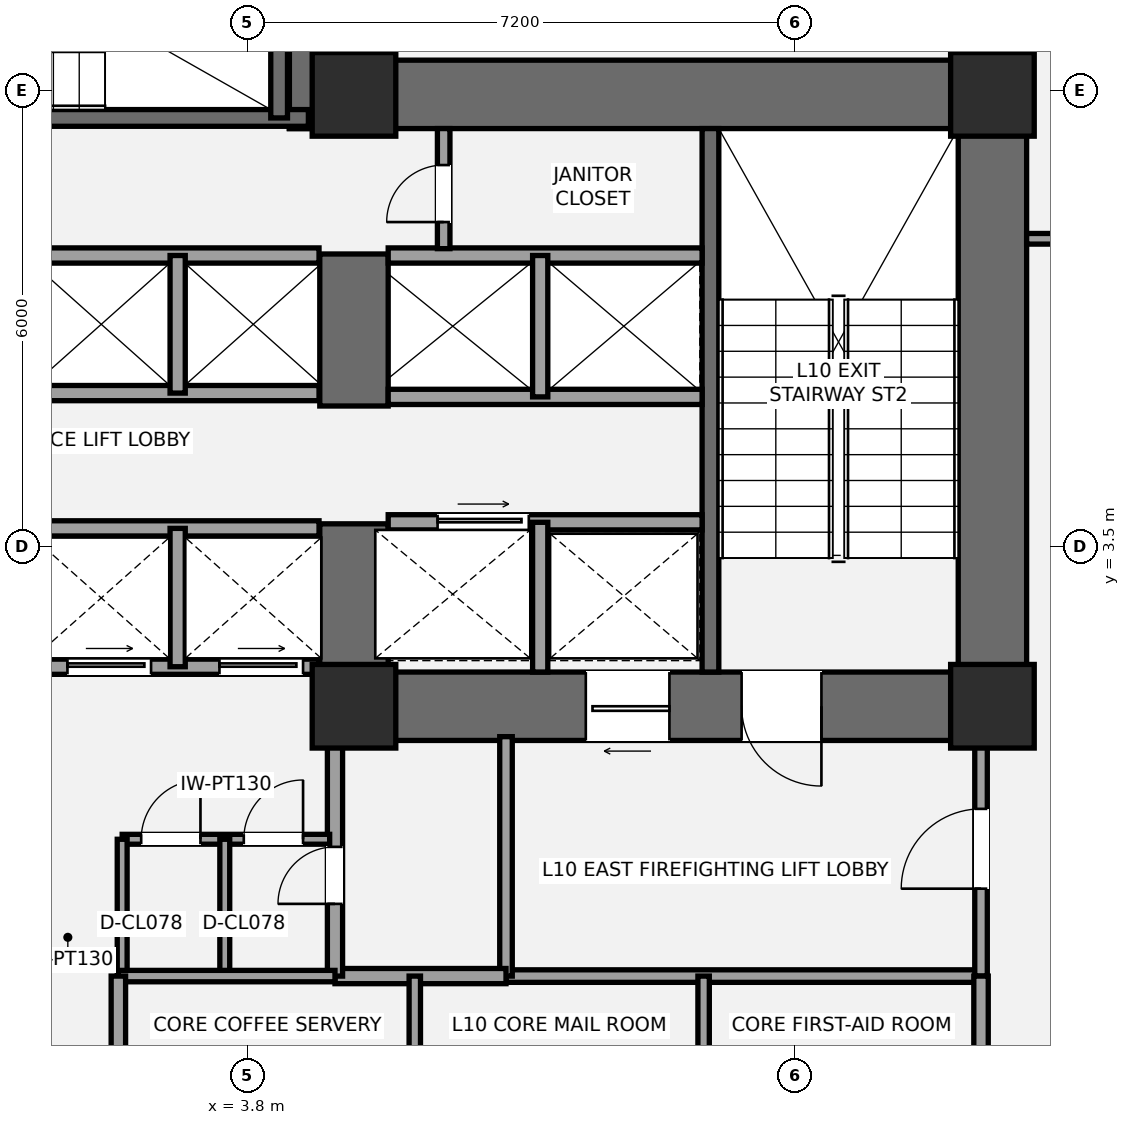
"""IFC4 building model, lengths in metres.
Left out: names, types, materials, properties, quantities, classifications, styles, units other than length and angle.
Written with IfcOpenShell. Run it as: python <this file> out.ifc"""

import sys

from ifc_helpers import new_model, si_unit, direction, frame, frame_2d, origin, origin_2d, place, context, subcontext, project, spatial, rectangle, extrude, element, fill, save


model = new_model("IFC4")
c1 = context("Model", 3, precision=1e-05, world=origin(), true_north=direction((0.0, 1.0)))
c2 = subcontext(c1, "Body", "Model", "MODEL_VIEW")
j1 = project(units=[si_unit("LENGTHUNIT", "METRE"), si_unit("PLANEANGLEUNIT", "RADIAN")], contexts=[c1])
p1 = place(None, origin())
s1 = spatial("IfcSite", under=j1, at=p1, CompositionType="ELEMENT")
p2 = place(p1, origin())
s2 = spatial("IfcBuilding", under=s1, at=p2, CompositionType="ELEMENT")
p3 = place(p2, frame((0.0, 0.0, 41.4)))
s3 = spatial("IfcBuildingStorey", under=s2, at=p3, CompositionType="ELEMENT", Elevation=41.4)
p4 = place(p3, frame((13.6, 0.95, 0.0), z_axis=(0.0, 0.0, 1.0), x_axis=(0.0, 1.0, 0.0)))
e1 = element("IfcWall", 1, at=p4, inside=s3, PredefinedType="SHEAR", context=c2, shape_type="SweptSolid", body=[
    extrude(rectangle(XDim=8.95, YDim=0.9, at=frame_2d((4.475, 0.0))), origin(), (0.0, 0.0, 1.0), 3.6),
])
p5 = place(p3, frame((4.35, 9.45, 0.0), z_axis=(0.0, 0.0, 1.0), x_axis=(1.0, 0.0, 0.0)))
e2 = element("IfcWall", 2, at=p5, inside=s3, PredefinedType="SHEAR", context=c2, shape_type="SweptSolid", body=[
    extrude(rectangle(XDim=9.7, YDim=0.9, at=frame_2d((4.85, 0.0))), origin(), (0.0, 0.0, 1.0), 3.6),
])
p6 = place(p3, frame((14.05, 1.4, 0.0), z_axis=(0.0, 0.0, 1.0), x_axis=(-1.0, 0.0, 0.0)))
e3 = element("IfcWall", 3, at=p6, inside=s3, PredefinedType="SHEAR", context=c2, shape_type="SweptSolid", body=[
    extrude(rectangle(XDim=9.3, YDim=0.9, at=frame_2d((4.65, 0.0))), origin(), (0.0, 0.0, 1.0), 3.6),
])
p7 = place(p6, frame((2.7, 0.0, 0.0)))
e4 = element("IfcOpeningElement", 4, at=p7, cuts=e3, PredefinedType="OPENING", context=c2, shape_type="SweptSolid", body=[
    extrude(rectangle(XDim=1.05, YDim=2.15, at=frame_2d((0.525, 1.075))), frame((0.0, 0.46, 0.0), z_axis=(0.0, -1.0, 0.0), x_axis=(1.0, 0.0, 0.0)), (0.0, 0.0, 1.0), 0.92),
])
p8 = place(p6, frame((4.7, 0.0, 0.0)))
e5 = element("IfcOpeningElement", 5, at=p8, cuts=e3, PredefinedType="OPENING", context=c2, shape_type="SweptSolid", body=[
    extrude(rectangle(XDim=1.1, YDim=2.2, at=frame_2d((0.55, 1.1))), frame((0.0, 0.46, 0.0), z_axis=(0.0, -1.0, 0.0), x_axis=(1.0, 0.0, 0.0)), (0.0, 0.0, 1.0), 0.92),
])
p9 = place(p3, frame((5.2, 0.95, 0.0), z_axis=(0.0, 0.0, 1.0), x_axis=(0.0, 1.0, 0.0)))
e6 = element("IfcWall", 6, at=p9, inside=s3, PredefinedType="SHEAR", context=c2, shape_type="SweptSolid", body=[
    extrude(rectangle(XDim=2.85, YDim=0.9, at=frame_2d((1.425, 0.0))), origin(), (0.0, 0.0, 1.0), 3.6),
])
p10 = place(p3, frame((5.2, 5.35, 0.0), z_axis=(0.0, 0.0, 1.0), x_axis=(0.0, 1.0, 0.0)))
e7 = element("IfcWall", 7, at=p10, inside=s3, PredefinedType="SHEAR", context=c2, shape_type="SweptSolid", body=[
    extrude(rectangle(XDim=2.0, YDim=0.9, at=frame_2d((1.0, 0.0))), origin(), (0.0, 0.0, 1.0), 3.6),
])
p11 = place(p3, frame((9.89, 1.85, 0.0), z_axis=(0.0, 0.0, 1.0), x_axis=(0.0, 1.0, 0.0)))
e8 = element("IfcWall", 8, at=p11, inside=s3, PredefinedType="SHEAR", context=c2, shape_type="SweptSolid", body=[
    extrude(rectangle(XDim=7.15, YDim=0.22, at=frame_2d((3.575, 0.0))), origin(), (0.0, 0.0, 1.0), 3.6),
])
p12 = place(p3, frame((4.8, 9.0, 0.0), z_axis=(0.0, 0.0, 1.0), x_axis=(0.0, 1.0, 0.0)))
e9 = element("IfcWall", 9, at=p12, inside=s3, PredefinedType="SHEAR", context=c2, shape_type="SweptSolid", body=[
    extrude(rectangle(XDim=4.3, YDim=0.9, at=frame_2d((2.15, 0.0))), origin(), (0.0, 0.0, 1.0), 3.6),
])
p13 = place(p3, frame((-4.7, 9.14, 0.0), z_axis=(0.0, 0.0, 1.0), x_axis=(1.0, 0.0, 0.0)))
e10 = element("IfcWall", 10, at=p13, inside=s3, PredefinedType="SHEAR", context=c2, shape_type="SweptSolid", body=[
    extrude(rectangle(XDim=9.3, YDim=0.22, at=frame_2d((4.65, 0.0))), origin(), (0.0, 0.0, 1.0), 3.6),
])
p14 = place(p13, frame((1.15, 0.0, 0.0)))
e11 = element("IfcOpeningElement", 11, at=p14, cuts=e10, PredefinedType="OPENING", context=c2, shape_type="SweptSolid", body=[
    extrude(rectangle(XDim=1.05, YDim=2.15, at=frame_2d((0.525, 1.075))), frame((0.0, 0.12, 0.0), z_axis=(0.0, -1.0, 0.0), x_axis=(1.0, 0.0, 0.0)), (0.0, 0.0, 1.0), 0.24),
])
p15 = place(p3, frame((4.215, 9.14, 0.0), z_axis=(0.0, 0.0, 1.0), x_axis=(0.0, 1.0, 0.0)))
e12 = element("IfcWall", 12, at=p15, inside=s3, PredefinedType="SHEAR", context=c2, shape_type="SweptSolid", body=[
    extrude(rectangle(XDim=3.26, YDim=0.22, at=frame_2d((1.63, 0.0))), origin(), (0.0, 0.0, 1.0), 3.6),
])
for number, where, z_axis, x_axis in (
    (13, (5.2, 1.4, 0.0), (0.0, 0.0, 1.0), (1.0, 0.0, 0.0)),
    (14, (5.2, 9.45, 0.0), (0.0, 0.0, 1.0), (1.0, 0.0, 0.0)),
    (15, (13.6, 1.4, 0.0), (0.0, 0.0, 1.0), (1.0, 0.0, 0.0)),
    (16, (13.6, 9.45, 0.0), (0.0, 0.0, 1.0), (1.0, 0.0, 0.0)),
):
    element("IfcColumn", number, at=place(p3, frame(where, z_axis=z_axis, x_axis=x_axis)), inside=s3, PredefinedType="COLUMN", context=c2, shape_type="SweptSolid", body=[
        extrude(rectangle(XDim=1.1, YDim=1.1, at=origin_2d()), origin(), (0.0, 0.0, 1.0), 3.6),
    ])
p16 = place(p3, frame((7.2, -2.15, 0.0), z_axis=(0.0, 0.0, 1.0), x_axis=(1.0, 0.0, 0.0)))
e17 = element("IfcWall", 17, at=p16, inside=s3, PredefinedType="PARTITIONING", context=c2, shape_type="SweptSolid", body=[
    extrude(rectangle(XDim=6.25, YDim=0.165, at=frame_2d((3.125, 0.0))), origin(), (0.0, 0.0, 1.0), 3.4),
])
p17 = place(p3, frame((7.2, -2.15, 0.0), z_axis=(0.0, 0.0, 1.0), x_axis=(0.0, 1.0, 0.0)))
e18 = element("IfcWall", 18, at=p17, inside=s3, PredefinedType="PARTITIONING", context=c2, shape_type="SweptSolid", body=[
    extrude(rectangle(XDim=3.15, YDim=0.165, at=frame_2d((1.575, 0.0))), origin(), (0.0, 0.0, 1.0), 2.853),
])
p18 = place(p3, frame((13.45, -2.15, 0.0), z_axis=(0.0, 0.0, 1.0), x_axis=(0.0, 1.0, 0.0)))
e19 = element("IfcWall", 19, at=p18, inside=s3, PredefinedType="PARTITIONING", context=c2, shape_type="SweptSolid", body=[
    extrude(rectangle(XDim=3.15, YDim=0.165, at=frame_2d((1.575, 0.0))), origin(), (0.0, 0.0, 1.0), 2.853),
])
p19 = place(p18, frame((1.15, 0.0, 0.0)))
e20 = element("IfcOpeningElement", 20, at=p19, cuts=e19, PredefinedType="OPENING", context=c2, shape_type="SweptSolid", body=[
    extrude(rectangle(XDim=1.05, YDim=2.15, at=frame_2d((0.525, 1.075))), frame((0.0, 0.093, 0.0), z_axis=(0.0, -1.0, 0.0), x_axis=(1.0, 0.0, 0.0)), (0.0, 0.0, 1.0), 0.185),
])
p20 = place(p3, frame((4.95, -2.15, 0.0), z_axis=(0.0, 0.0, 1.0), x_axis=(1.0, 0.0, 0.0)))
e21 = element("IfcWall", 21, at=p20, inside=s3, PredefinedType="SOLIDWALL", context=c2, shape_type="SweptSolid", body=[
    extrude(rectangle(XDim=2.25, YDim=0.2, at=frame_2d((1.125, 0.0))), origin(), (0.0, 0.0, 1.0), 3.4),
])
p21 = place(p3, frame((4.95, -2.15, 0.0), z_axis=(0.0, 0.0, 1.0), x_axis=(0.0, 1.0, 0.0)))
e22 = element("IfcWall", 22, at=p21, inside=s3, PredefinedType="SOLIDWALL", context=c2, shape_type="SweptSolid", body=[
    extrude(rectangle(XDim=3.15, YDim=0.2, at=frame_2d((1.575, 0.0))), origin(), (0.0, 0.0, 1.0), 3.4),
])
p22 = place(p21, frame((0.95, 0.0, 0.0)))
e23 = element("IfcOpeningElement", 23, at=p22, cuts=e22, PredefinedType="OPENING", context=c2, shape_type="SweptSolid", body=[
    extrude(rectangle(XDim=0.75, YDim=2.1, at=frame_2d((0.375, 1.05))), frame((0.0, 0.11, 0.0), z_axis=(0.0, -1.0, 0.0), x_axis=(1.0, 0.0, 0.0)), (0.0, 0.0, 1.0), 0.22),
])
p23 = place(p3, frame((2.15, -0.35, 0.0), z_axis=(0.0, 0.0, 1.0), x_axis=(1.0, 0.0, 0.0)))
e24 = element("IfcWall", 24, at=p23, inside=s3, PredefinedType="PARTITIONING", context=c2, shape_type="SweptSolid", body=[
    extrude(rectangle(XDim=2.73, YDim=0.13, at=frame_2d((1.365, 0.0))), origin(), (0.0, 0.0, 1.0), 3.4),
])
p24 = place(p23, frame((0.25, 0.0, 0.0)))
e25 = element("IfcOpeningElement", 25, at=p24, cuts=e24, PredefinedType="OPENING", context=c2, shape_type="SweptSolid", body=[
    extrude(rectangle(XDim=0.78, YDim=2.1, at=frame_2d((0.39, 1.05))), frame((0.0, 0.075, 0.0), z_axis=(0.0, -1.0, 0.0), x_axis=(1.0, 0.0, 0.0)), (0.0, 0.0, 1.0), 0.15),
])
p25 = place(p23, frame((1.6, 0.0, 0.0)))
e26 = element("IfcOpeningElement", 26, at=p25, cuts=e24, PredefinedType="OPENING", context=c2, shape_type="SweptSolid", body=[
    extrude(rectangle(XDim=0.78, YDim=2.1, at=frame_2d((0.39, 1.05))), frame((0.0, 0.075, 0.0), z_axis=(0.0, -1.0, 0.0), x_axis=(1.0, 0.0, 0.0)), (0.0, 0.0, 1.0), 0.15),
])
for number, where, z_axis, x_axis in (
    (27, (2.15, -2.15, 0.0), (0.0, 0.0, 1.0), (0.0, 1.0, 0.0)),
    (28, (3.5, -2.15, 0.0), (0.0, 0.0, 1.0), (0.0, 1.0, 0.0)),
):
    element("IfcWall", number, at=place(p3, frame(where, z_axis=z_axis, x_axis=x_axis)), inside=s3, PredefinedType="PARTITIONING", context=c2, shape_type="SweptSolid", body=[
        extrude(rectangle(XDim=1.8, YDim=0.13, at=frame_2d((0.9, 0.0))), origin(), (0.0, 0.0, 1.0), 3.4),
    ])
p26 = place(p3, frame((5.65, 3.82, 0.0), z_axis=(0.0, 0.0, 1.0), x_axis=(1.0, 0.0, 0.0)))
e29 = element("IfcWall", 29, at=p26, inside=s3, PredefinedType="SOLIDWALL", context=c2, shape_type="SweptSolid", body=[
    extrude(rectangle(XDim=4.13, YDim=0.2, at=frame_2d((2.065, 0.0))), origin(), (0.0, 0.0, 1.0), 3.4),
])
p27 = place(p26, frame((0.65, 0.0, 0.0)))
e30 = element("IfcOpeningElement", 30, at=p27, cuts=e29, PredefinedType="OPENING", context=c2, shape_type="SweptSolid", body=[
    extrude(rectangle(XDim=1.2, YDim=2.2, at=frame_2d((0.6, 1.1))), frame((0.0, 0.11, 0.0), z_axis=(0.0, -1.0, 0.0), x_axis=(1.0, 0.0, 0.0)), (0.0, 0.0, 1.0), 0.22),
])
p28 = place(p3, frame((7.65, 1.85, 0.0), z_axis=(0.0, 0.0, 1.0), x_axis=(0.0, 1.0, 0.0)))
e31 = element("IfcWall", 31, at=p28, inside=s3, PredefinedType="SOLIDWALL", context=c2, shape_type="SweptSolid", body=[
    extrude(rectangle(XDim=1.97, YDim=0.2, at=frame_2d((0.985, 0.0))), origin(), (0.0, 0.0, 1.0), 3.4),
])
for number, where, z_axis, x_axis in (
    (32, (5.65, 5.47, 0.0), (0.0, 0.0, 1.0), (1.0, 0.0, 0.0)),
    (33, (5.65, 7.33, 0.0), (0.0, 0.0, 1.0), (1.0, 0.0, 0.0)),
):
    element("IfcWall", number, at=place(p3, frame(where, z_axis=z_axis, x_axis=x_axis)), inside=s3, PredefinedType="SOLIDWALL", context=c2, shape_type="SweptSolid", body=[
        extrude(rectangle(XDim=4.13, YDim=0.2, at=frame_2d((2.065, 0.0))), origin(), (0.0, 0.0, 1.0), 3.4),
    ])
p29 = place(p3, frame((7.65, 5.47, 0.0), z_axis=(0.0, 0.0, 1.0), x_axis=(0.0, 1.0, 0.0)))
e34 = element("IfcWall", 34, at=p29, inside=s3, PredefinedType="SOLIDWALL", context=c2, shape_type="SweptSolid", body=[
    extrude(rectangle(XDim=1.86, YDim=0.2, at=frame_2d((0.93, 0.0))), origin(), (0.0, 0.0, 1.0), 3.4),
])
p30 = place(p3, frame((0.88, 1.92, 0.0), z_axis=(0.0, 0.0, 1.0), x_axis=(1.0, 0.0, 0.0)))
e35 = element("IfcWall", 35, at=p30, inside=s3, PredefinedType="SOLIDWALL", context=c2, shape_type="SweptSolid", body=[
    extrude(rectangle(XDim=3.86, YDim=0.2, at=frame_2d((1.93, 0.0))), origin(), (0.0, 0.0, 1.0), 2.39),
])
p31 = place(p30, frame((0.55, 0.0, 0.0)))
e36 = element("IfcOpeningElement", 36, at=p31, cuts=e35, PredefinedType="OPENING", context=c2, shape_type="SweptSolid", body=[
    extrude(rectangle(XDim=1.1, YDim=2.2, at=frame_2d((0.55, 1.1))), frame((0.0, 0.11, 0.0), z_axis=(0.0, -1.0, 0.0), x_axis=(1.0, 0.0, 0.0)), (0.0, 0.0, 1.0), 0.22),
])
p32 = place(p30, frame((2.55, 0.0, 0.0)))
e37 = element("IfcOpeningElement", 37, at=p32, cuts=e35, PredefinedType="OPENING", context=c2, shape_type="SweptSolid", body=[
    extrude(rectangle(XDim=1.1, YDim=2.2, at=frame_2d((0.55, 1.1))), frame((0.0, 0.11, 0.0), z_axis=(0.0, -1.0, 0.0), x_axis=(1.0, 0.0, 0.0)), (0.0, 0.0, 1.0), 0.22),
])
p33 = place(p3, frame((0.88, 3.74, 0.0), z_axis=(0.0, 0.0, 1.0), x_axis=(1.0, 0.0, 0.0)))
e38 = element("IfcWall", 38, at=p33, inside=s3, PredefinedType="SOLIDWALL", context=c2, shape_type="SweptSolid", body=[
    extrude(rectangle(XDim=3.86, YDim=0.2, at=frame_2d((1.93, 0.0))), origin(), (0.0, 0.0, 1.0), 3.4),
])
p34 = place(p3, frame((2.88, 1.92, 0.0), z_axis=(0.0, 0.0, 1.0), x_axis=(0.0, 1.0, 0.0)))
e39 = element("IfcWall", 39, at=p34, inside=s3, PredefinedType="SOLIDWALL", context=c2, shape_type="SweptSolid", body=[
    extrude(rectangle(XDim=1.82, YDim=0.2, at=frame_2d((0.91, 0.0))), origin(), (0.0, 0.0, 1.0), 3.4),
])
for number, where, z_axis, x_axis in (
    (40, (0.88, 5.52, 0.0), (0.0, 0.0, 1.0), (1.0, 0.0, 0.0)),
    (41, (0.88, 7.33, 0.0), (0.0, 0.0, 1.0), (1.0, 0.0, 0.0)),
):
    element("IfcWall", number, at=place(p3, frame(where, z_axis=z_axis, x_axis=x_axis)), inside=s3, PredefinedType="SOLIDWALL", context=c2, shape_type="SweptSolid", body=[
        extrude(rectangle(XDim=3.86, YDim=0.2, at=frame_2d((1.93, 0.0))), origin(), (0.0, 0.0, 1.0), 3.4),
    ])
p35 = place(p3, frame((2.88, 5.52, 0.0), z_axis=(0.0, 0.0, 1.0), x_axis=(0.0, 1.0, 0.0)))
e42 = element("IfcWall", 42, at=p35, inside=s3, PredefinedType="SOLIDWALL", context=c2, shape_type="SweptSolid", body=[
    extrude(rectangle(XDim=1.81, YDim=0.2, at=frame_2d((0.905, 0.0))), origin(), (0.0, 0.0, 1.0), 3.4),
])
p36 = place(p3, frame((6.38, 7.42, 0.0), z_axis=(0.0, 0.0, 1.0), x_axis=(0.0, 1.0, 0.0)))
e43 = element("IfcWall", 43, at=p36, inside=s3, PredefinedType="PARTITIONING", context=c2, shape_type="SweptSolid", body=[
    extrude(rectangle(XDim=1.58, YDim=0.165, at=frame_2d((0.79, 0.0))), origin(), (0.0, 0.0, 1.0), 3.4),
])
p37 = place(p36, frame((0.35, 0.0, 0.0)))
e44 = element("IfcOpeningElement", 44, at=p37, cuts=e43, PredefinedType="OPENING", context=c2, shape_type="SweptSolid", body=[
    extrude(rectangle(XDim=0.75, YDim=2.1, at=frame_2d((0.375, 1.05))), frame((0.0, 0.093, 0.0), z_axis=(0.0, -1.0, 0.0), x_axis=(1.0, 0.0, 0.0)), (0.0, 0.0, 1.0), 0.185),
])
p38 = place(p3, frame((2.1, -2.15, 0.0), z_axis=(0.0, 0.0, 1.0), x_axis=(1.0, 0.0, 0.0)))
e45 = element("IfcWall", 45, at=p38, inside=s3, PredefinedType="PLUMBINGWALL", context=c2, shape_type="SweptSolid", body=[
    extrude(rectangle(XDim=2.85, YDim=0.15, at=frame_2d((1.425, 0.0))), origin(), (0.0, 0.0, 1.0), 3.4),
])
p39 = place(p3, frame((2.1, -4.05, 0.0), z_axis=(0.0, 0.0, 1.0), x_axis=(0.0, 1.0, 0.0)))
e46 = element("IfcWall", 46, at=p39, inside=s3, PredefinedType="PLUMBINGWALL", context=c2, shape_type="SweptSolid", body=[
    extrude(rectangle(XDim=1.9, YDim=0.19, at=frame_2d((0.95, 0.0))), origin(), (0.0, 0.0, 1.0), 3.4),
])
p40 = place(p3, frame((13.45, -4.05, 0.0), z_axis=(0.0, 0.0, 1.0), x_axis=(0.0, 1.0, 0.0)))
e47 = element("IfcWall", 47, at=p40, inside=s3, PredefinedType="PLUMBINGWALL", context=c2, shape_type="SweptSolid", body=[
    extrude(rectangle(XDim=1.9, YDim=0.19, at=frame_2d((0.95, 0.0))), origin(), (0.0, 0.0, 1.0), 2.853),
])
p41 = place(p3, frame((6.0, -4.05, 0.0), z_axis=(0.0, 0.0, 1.0), x_axis=(0.0, 1.0, 0.0)))
e48 = element("IfcWall", 48, at=p41, inside=s3, PredefinedType="PLUMBINGWALL", context=c2, shape_type="SweptSolid", body=[
    extrude(rectangle(XDim=1.9, YDim=0.15, at=frame_2d((0.95, 0.0))), origin(), (0.0, 0.0, 1.0), 2.841),
])
p42 = place(p3, frame((9.8, -4.05, 0.0), z_axis=(0.0, 0.0, 1.0), x_axis=(0.0, 1.0, 0.0)))
e49 = element("IfcWall", 49, at=p42, inside=s3, PredefinedType="PLUMBINGWALL", context=c2, shape_type="SweptSolid", body=[
    extrude(rectangle(XDim=1.9, YDim=0.15, at=frame_2d((0.95, 0.0))), origin(), (0.0, 0.0, 1.0), 2.853),
])
p43 = place(p3, frame((14.05, 7.55, 0.0), z_axis=(0.0, 0.0, 1.0), x_axis=(1.0, 0.0, 0.0)))
e50 = element("IfcWall", 50, at=p43, inside=s3, PredefinedType="PARTITIONING", context=c2, shape_type="SweptSolid", body=[
    extrude(rectangle(XDim=10.806, YDim=0.14, at=frame_2d((5.403, 0.0))), origin(), (0.0, 0.0, 1.0), 2.853),
])
p44 = place(p43, frame((1.2, 0.0, 0.0)))
e51 = element("IfcOpeningElement", 51, at=p44, cuts=e50, PredefinedType="OPENING", context=c2, shape_type="SweptSolid", body=[
    extrude(rectangle(XDim=0.92, YDim=2.15, at=frame_2d((0.46, 1.075))), frame((0.0, 0.08, 0.0), z_axis=(0.0, -1.0, 0.0), x_axis=(1.0, 0.0, 0.0)), (0.0, 0.0, 1.0), 0.16),
])
p45 = place(p7, origin())
e52 = element("IfcDoor", 52, at=p45, inside=s3, OperationType="SINGLE_SWING_LEFT", PredefinedType="DOOR", context=c2, shape_type="SweptSolid", body=[
    extrude(rectangle(XDim=1.05, YDim=2.15, at=frame_2d((0.525, 1.075))), frame((0.0, 0.025, 0.0), z_axis=(0.0, -1.0, 0.0), x_axis=(1.0, 0.0, 0.0)), (0.0, 0.0, 1.0), 0.05),
])
fill(e4, e52)
p46 = place(p19, origin())
e53 = element("IfcDoor", 53, at=p46, inside=s3, OperationType="SINGLE_SWING_LEFT", PredefinedType="DOOR", context=c2, shape_type="SweptSolid", body=[
    extrude(rectangle(XDim=1.05, YDim=2.15, at=frame_2d((0.525, 1.075))), frame((0.0, 0.025, 0.0), z_axis=(0.0, -1.0, 0.0), x_axis=(1.0, 0.0, 0.0)), (0.0, 0.0, 1.0), 0.05),
])
fill(e20, e53)
p47 = place(p22, origin())
e54 = element("IfcDoor", 54, at=p47, inside=s3, OperationType="SINGLE_SWING_LEFT", PredefinedType="DOOR", context=c2, shape_type="SweptSolid", body=[
    extrude(rectangle(XDim=0.75, YDim=2.1, at=frame_2d((0.375, 1.05))), frame((0.0, 0.025, 0.0), z_axis=(0.0, -1.0, 0.0), x_axis=(1.0, 0.0, 0.0)), (0.0, 0.0, 1.0), 0.05),
])
fill(e23, e54)
p48 = place(p24, origin())
e55 = element("IfcDoor", 55, at=p48, inside=s3, OperationType="SINGLE_SWING_RIGHT", PredefinedType="DOOR", context=c2, shape_type="SweptSolid", body=[
    extrude(rectangle(XDim=0.78, YDim=2.1, at=frame_2d((0.39, 1.05))), frame((0.0, 0.025, 0.0), z_axis=(0.0, -1.0, 0.0), x_axis=(1.0, 0.0, 0.0)), (0.0, 0.0, 1.0), 0.05),
])
fill(e25, e55)
p49 = place(p25, origin())
e56 = element("IfcDoor", 56, at=p49, inside=s3, OperationType="SINGLE_SWING_RIGHT", PredefinedType="DOOR", context=c2, shape_type="SweptSolid", body=[
    extrude(rectangle(XDim=0.78, YDim=2.1, at=frame_2d((0.39, 1.05))), frame((0.0, 0.025, 0.0), z_axis=(0.0, -1.0, 0.0), x_axis=(1.0, 0.0, 0.0)), (0.0, 0.0, 1.0), 0.05),
])
fill(e26, e56)
p50 = place(p8, origin())
e57 = element("IfcDoor", 57, at=p50, inside=s3, OperationType="SLIDING_TO_LEFT", PredefinedType="DOOR", context=c2, shape_type="SweptSolid", body=[
    extrude(rectangle(XDim=1.1, YDim=2.2, at=frame_2d((0.55, 1.1))), frame((0.0, 0.025, 0.0), z_axis=(0.0, -1.0, 0.0), x_axis=(1.0, 0.0, 0.0)), (0.0, 0.0, 1.0), 0.05),
])
fill(e5, e57)
p51 = place(p27, origin())
e58 = element("IfcDoor", 58, at=p51, inside=s3, OperationType="SLIDING_TO_RIGHT", PredefinedType="DOOR", context=c2, shape_type="SweptSolid", body=[
    extrude(rectangle(XDim=1.2, YDim=2.2, at=frame_2d((0.6, 1.1))), frame((0.0, 0.025, 0.0), z_axis=(0.0, -1.0, 0.0), x_axis=(1.0, 0.0, 0.0)), (0.0, 0.0, 1.0), 0.05),
])
fill(e30, e58)
p52 = place(p31, origin())
e59 = element("IfcDoor", 59, at=p52, inside=s3, OperationType="SLIDING_TO_LEFT", PredefinedType="DOOR", context=c2, shape_type="SweptSolid", body=[
    extrude(rectangle(XDim=1.1, YDim=2.2, at=frame_2d((0.55, 1.1))), frame((0.0, 0.025, 0.0), z_axis=(0.0, -1.0, 0.0), x_axis=(1.0, 0.0, 0.0)), (0.0, 0.0, 1.0), 0.05),
])
fill(e36, e59)
p53 = place(p32, origin())
e60 = element("IfcDoor", 60, at=p53, inside=s3, OperationType="SLIDING_TO_LEFT", PredefinedType="DOOR", context=c2, shape_type="SweptSolid", body=[
    extrude(rectangle(XDim=1.1, YDim=2.2, at=frame_2d((0.55, 1.1))), frame((0.0, 0.025, 0.0), z_axis=(0.0, -1.0, 0.0), x_axis=(1.0, 0.0, 0.0)), (0.0, 0.0, 1.0), 0.05),
])
fill(e37, e60)
p54 = place(p37, origin())
e61 = element("IfcDoor", 61, at=p54, inside=s3, OperationType="SINGLE_SWING_LEFT", PredefinedType="DOOR", context=c2, shape_type="SweptSolid", body=[
    extrude(rectangle(XDim=0.75, YDim=2.1, at=frame_2d((0.375, 1.05))), frame((0.0, 0.025, 0.0), z_axis=(0.0, -1.0, 0.0), x_axis=(1.0, 0.0, 0.0)), (0.0, 0.0, 1.0), 0.05),
])
fill(e44, e61)
save(model, sys.argv[1])
